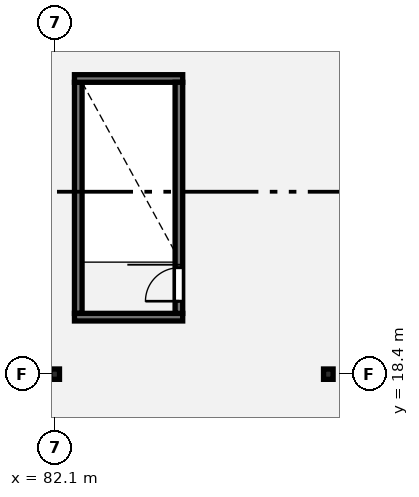
"""IFC4 building model, lengths in metres.
Left out: names, types, materials, properties, quantities, classifications, styles, units other than length and angle.
Written with IfcOpenShell. Run it as: python <this file> out.ifc"""

import sys

from ifc_helpers import new_model, si_unit, direction, frame, frame_2d, origin, origin_2d, place, context, subcontext, project, spatial, rectangle, i_section, extrude, element, fill, save


model = new_model("IFC4")
c1 = context("Model", 3, precision=1e-05, world=origin(), true_north=direction((0.0, 1.0)))
c2 = subcontext(c1, "Body", "Model", "MODEL_VIEW")
j1 = project(units=[si_unit("LENGTHUNIT", "METRE"), si_unit("PLANEANGLEUNIT", "RADIAN")], contexts=[c1])
p1 = place(None, origin())
s1 = spatial("IfcSite", under=j1, at=p1, CompositionType="ELEMENT")
p2 = place(p1, origin())
s2 = spatial("IfcBuilding", under=s1, at=p2, CompositionType="ELEMENT")
p3 = place(p2, frame((0.0, 0.0, 207.6)))
s3 = spatial("IfcBuildingStorey", under=s2, at=p3, CompositionType="ELEMENT", Elevation=207.6)
for number, where, z_axis, x_axis in (
    (1, (82.1, 18.4, 0.0), (0.0, 0.0, 1.0), (1.0, 0.0, 0.0)),
    (2, (91.1, 18.4, 0.0), (0.0, 0.0, 1.0), (1.0, 0.0, 0.0)),
):
    element("IfcColumn", number, at=place(p3, frame(where, z_axis=z_axis, x_axis=x_axis)), inside=s3, PredefinedType="COLUMN", context=c2, shape_type="SweptSolid", body=[
        extrude(i_section(OverallWidth=0.314, OverallDepth=0.34, WebThickness=0.019, FlangeThickness=0.031, FilletRadius=0.015, at=origin_2d()), origin(), (0.0, 0.0, 1.0), 9.65),
    ])
p4 = place(p3, frame((82.875, 20.4, 0.0), z_axis=(0.0, 0.0, 1.0), x_axis=(0.0, 1.0, 0.0)))
e3 = element("IfcWall", 3, at=p4, inside=s3, PredefinedType="SHEAR", context=c2, shape_type="SweptSolid", body=[
    extrude(rectangle(XDim=7.6, YDim=0.25, at=frame_2d((3.8, 0.0))), origin(), (0.0, 0.0, 1.0), 9.65),
])
for number, where, z_axis, x_axis in (
    (4, (82.75, 20.275, 0.0), (0.0, 0.0, 1.0), (1.0, 0.0, 0.0)),
    (5, (82.75, 28.125, 0.0), (0.0, 0.0, 1.0), (1.0, 0.0, 0.0)),
):
    element("IfcWall", number, at=place(p3, frame(where, z_axis=z_axis, x_axis=x_axis)), inside=s3, PredefinedType="SHEAR", context=c2, shape_type="SweptSolid", body=[
        extrude(rectangle(XDim=3.56, YDim=0.25, at=frame_2d((1.78, 0.0))), origin(), (0.0, 0.0, 1.0), 9.65),
    ])
p5 = place(p3, frame((86.185, 20.4, 0.0), z_axis=(0.0, 0.0, 1.0), x_axis=(0.0, 1.0, 0.0)))
e6 = element("IfcWall", 6, at=p5, inside=s3, PredefinedType="SHEAR", context=c2, shape_type="SweptSolid", body=[
    extrude(rectangle(XDim=7.6, YDim=0.25, at=frame_2d((3.8, 0.0))), origin(), (0.0, 0.0, 1.0), 9.65),
])
p6 = place(p5, frame((0.4, 0.0, 0.0)))
e7 = element("IfcOpeningElement", 7, at=p6, cuts=e6, PredefinedType="OPENING", context=c2, shape_type="SweptSolid", body=[
    extrude(rectangle(XDim=1.1, YDim=2.1, at=frame_2d((0.55, 1.05))), frame((0.0, 0.135, 0.0), z_axis=(0.0, -1.0, 0.0), x_axis=(1.0, 0.0, 0.0)), (0.0, 0.0, 1.0), 0.27),
])
p7 = place(p6, origin())
e8 = element("IfcDoor", 8, at=p7, inside=s3, OperationType="SINGLE_SWING_LEFT", PredefinedType="DOOR", context=c2, shape_type="SweptSolid", body=[
    extrude(rectangle(XDim=1.1, YDim=2.1, at=frame_2d((0.55, 1.05))), frame((0.0, 0.025, 0.0), z_axis=(0.0, -1.0, 0.0), x_axis=(1.0, 0.0, 0.0)), (0.0, 0.0, 1.0), 0.05),
])
fill(e7, e8)
save(model, sys.argv[1])
